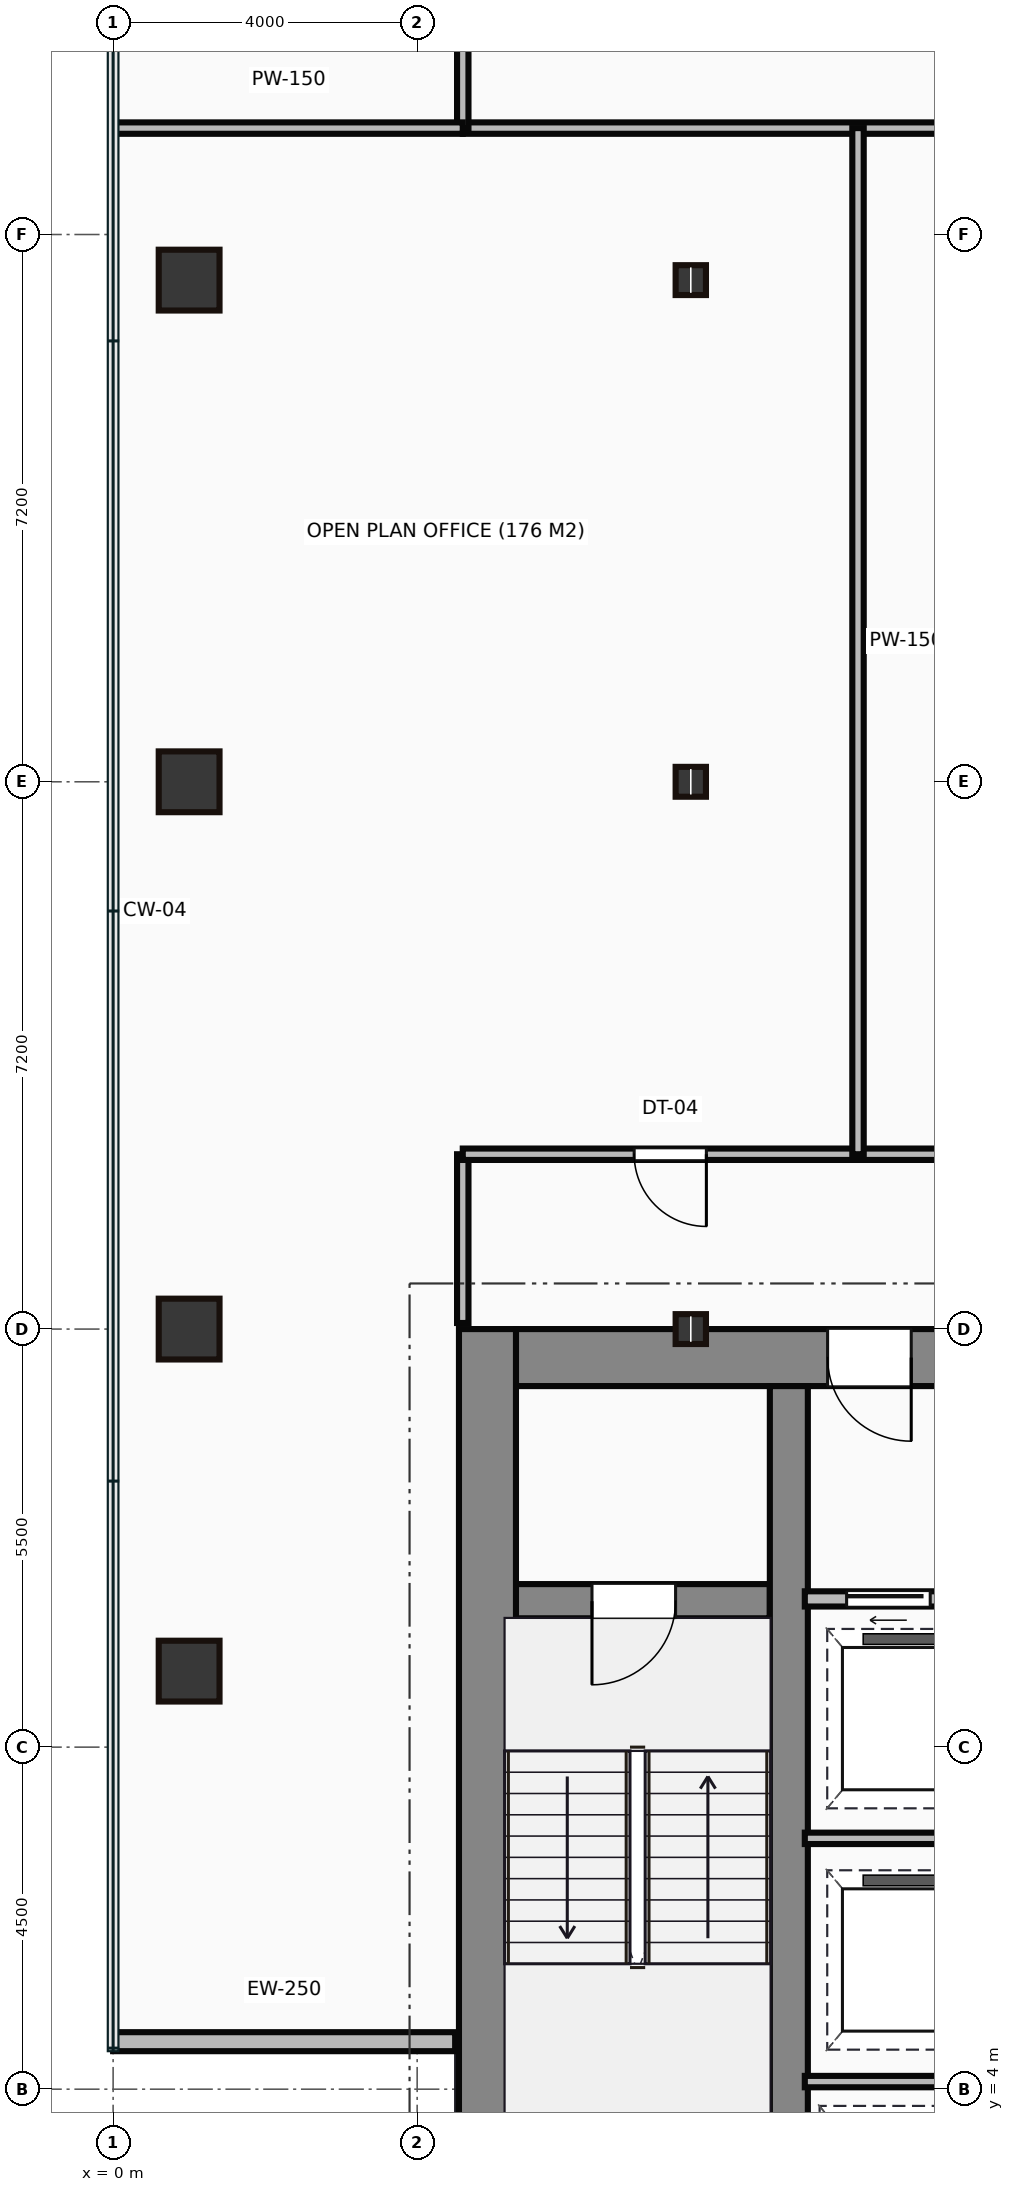
"""IFC4 building model, lengths in metres.
Left out: names, types, materials, properties, quantities, classifications, styles, units other than length and angle.
Written with IfcOpenShell. Run it as: python <this file> out.ifc"""

import sys

from ifc_helpers import new_model, si_unit, direction, frame, frame_2d, origin, origin_2d, place, context, subcontext, project, spatial, rectangle, hollow_rectangle, i_section, extrude, source, transform, mapped, element, fill, save


model = new_model("IFC4")
c1 = context("Model", 3, precision=1e-05, world=origin(), true_north=direction((0.0, 1.0)))
c2 = subcontext(c1, "Body", "Model", "MODEL_VIEW")
j1 = project(units=[si_unit("LENGTHUNIT", "METRE"), si_unit("PLANEANGLEUNIT", "RADIAN")], contexts=[c1])
p1 = place(None, origin())
s1 = spatial("IfcSite", under=j1, at=p1, CompositionType="ELEMENT")
p2 = place(p1, origin())
s2 = spatial("IfcBuilding", under=s1, at=p2, CompositionType="ELEMENT")
p3 = place(p2, frame((0.0, 0.0, 121.5)))
s3 = spatial("IfcBuildingStorey", under=s2, at=p3, CompositionType="ELEMENT", Elevation=121.5)
m1 = source(origin(), c2, "Body", "SweptSolid", [
    extrude(rectangle(XDim=13.1, YDim=0.75, at=frame_2d((6.55, 0.0))), origin(), (0.0, 0.0, 1.0), 3.65),
])
p4 = place(p3, frame((4.925, 0.9, 0.0), z_axis=(0.0, 0.0, 1.0), x_axis=(0.0, 1.0, 0.0)))
e1 = element("IfcWall", 1, at=p4, inside=s3, PredefinedType="SHEAR", context=c2, shape_type="MappedRepresentation", body=[
    mapped(m1, transform((0.0, 0.0, 0.0))),
])
m2 = source(origin(), c2, "Body", "SweptSolid", [
    extrude(rectangle(XDim=9.1, YDim=0.75, at=frame_2d((4.55, 0.0))), origin(), (0.0, 0.0, 1.0), 3.65),
])
p5 = place(p3, frame((5.3, 13.625, 0.0), z_axis=(0.0, 0.0, 1.0), x_axis=(1.0, 0.0, 0.0)))
e2 = element("IfcWall", 2, at=p5, inside=s3, PredefinedType="SHEAR", context=c2, shape_type="MappedRepresentation", body=[
    mapped(m2, transform((0.0, 0.0, 0.0))),
])
p6 = place(p5, frame((4.1, 0.0, 0.0)))
e3 = element("IfcOpeningElement", 3, at=p6, cuts=e2, PredefinedType="OPENING", context=c2, shape_type="SweptSolid", body=[
    extrude(rectangle(XDim=1.1, YDim=2.15, at=frame_2d((0.55, 1.075))), frame((0.0, 0.385, 0.0), z_axis=(0.0, -1.0, 0.0), x_axis=(1.0, 0.0, 0.0)), (0.0, 0.0, 1.0), 0.77),
])
m3 = source(origin(), c2, "Body", "SweptSolid", [
    extrude(rectangle(XDim=12.35, YDim=0.5, at=frame_2d((6.175, 0.0))), origin(), (0.0, 0.0, 1.0), 3.65),
])
p7 = place(p3, frame((8.89, 0.9, 0.0), z_axis=(0.0, 0.0, 1.0), x_axis=(0.0, 1.0, 0.0)))
e4 = element("IfcWall", 4, at=p7, inside=s3, PredefinedType="SHEAR", context=c2, shape_type="MappedRepresentation", body=[
    mapped(m3, transform((0.0, 0.0, 0.0))),
])
m4 = source(origin(), c2, "Body", "SweptSolid", [
    extrude(rectangle(XDim=3.39, YDim=0.45, at=frame_2d((1.695, 0.0))), origin(), (0.0, 0.0, 1.0), 3.65),
])
p8 = place(p3, frame((5.25, 10.42, 0.0), z_axis=(0.0, 0.0, 1.0), x_axis=(1.0, 0.0, 0.0)))
e5 = element("IfcWall", 5, at=p8, inside=s3, PredefinedType="SHEAR", context=c2, shape_type="MappedRepresentation", body=[
    mapped(m4, transform((0.0, 0.0, 0.0))),
])
p9 = place(p8, frame((1.05, 0.0, 0.0)))
e6 = element("IfcOpeningElement", 6, at=p9, cuts=e5, PredefinedType="OPENING", context=c2, shape_type="SweptSolid", body=[
    extrude(rectangle(XDim=1.1, YDim=2.15, at=frame_2d((0.55, 1.075))), frame((0.0, 0.235, 0.0), z_axis=(0.0, -1.0, 0.0), x_axis=(1.0, 0.0, 0.0)), (0.0, 0.0, 1.0), 0.47),
])
m5 = source(origin(), c2, "Body", "SweptSolid", [
    extrude(hollow_rectangle(XDim=0.8, YDim=0.8, WallThickness=0.04, at=origin_2d()), origin(), (0.0, 0.0, 1.0), 3.65),
])
for number, where, z_axis, x_axis in (
    (7, (1.0, 9.5, 0.0), (0.0, 0.0, 1.0), (1.0, 0.0, 0.0)),
    (8, (1.0, 14.0, 0.0), (0.0, 0.0, 1.0), (1.0, 0.0, 0.0)),
    (9, (1.0, 21.2, 0.0), (0.0, 0.0, 1.0), (1.0, 0.0, 0.0)),
    (10, (1.0, 27.8, 0.0), (0.0, 0.0, 1.0), (1.0, 0.0, 0.0)),
):
    element("IfcColumn", number, at=place(p3, frame(where, z_axis=z_axis, x_axis=x_axis)), inside=s3, PredefinedType="COLUMN", context=c2, shape_type="MappedRepresentation", body=[
        mapped(m5, transform((0.0, 0.0, 0.0))),
    ])
m6 = source(origin(), c2, "Body", "SweptSolid", [
    extrude(i_section(OverallWidth=0.399, OverallDepth=0.393, WebThickness=0.023, FlangeThickness=0.037, at=origin_2d()), origin(), (0.0, 0.0, 1.0), 3.65),
])
for number, where, z_axis, x_axis in (
    (11, (7.6, 14.0, 0.0), (0.0, 0.0, 1.0), (1.0, 0.0, 0.0)),
    (12, (7.6, 21.2, 0.0), (0.0, 0.0, 1.0), (1.0, 0.0, 0.0)),
    (13, (7.6, 27.8, 0.0), (0.0, 0.0, 1.0), (1.0, 0.0, 0.0)),
):
    element("IfcColumn", number, at=place(p3, frame(where, z_axis=z_axis, x_axis=x_axis)), inside=s3, PredefinedType="COLUMN", context=c2, shape_type="MappedRepresentation", body=[
        mapped(m6, transform((0.0, 0.0, 0.0))),
    ])
m7 = source(origin(), c2, "Body", "SweptSolid", [
    extrude(rectangle(XDim=4.5, YDim=0.25, at=frame_2d((2.25, 0.0))), origin(), (0.0, 0.0, 1.0), 3.4),
])
p10 = place(p3, frame((0.0, 4.625, 0.0), z_axis=(0.0, 0.0, 1.0), x_axis=(1.0, 0.0, 0.0)))
e14 = element("IfcWall", 14, at=p10, inside=s3, PredefinedType="STANDARD", context=c2, shape_type="MappedRepresentation", body=[
    mapped(m7, transform((0.0, 0.0, 0.0))),
])
m8 = source(origin(), c2, "Body", "SweptSolid", [
    extrude(rectangle(XDim=2.35, YDim=0.2, at=frame_2d((1.175, 0.0))), origin(), (0.0, 0.0, 1.0), 3.4),
])
p11 = place(p3, frame((9.1, 10.45, 0.0), z_axis=(0.0, 0.0, 1.0), x_axis=(1.0, 0.0, 0.0)))
e15 = element("IfcWall", 15, at=p11, inside=s3, PredefinedType="PARTITIONING", context=c2, shape_type="MappedRepresentation", body=[
    mapped(m8, transform((0.0, 0.0, 0.0))),
])
p12 = place(p11, frame((0.55, 0.0, 0.0)))
e16 = element("IfcOpeningElement", 16, at=p12, cuts=e15, PredefinedType="OPENING", context=c2, shape_type="SweptSolid", body=[
    extrude(rectangle(XDim=1.1, YDim=2.15, at=frame_2d((0.55, 1.075))), frame((0.0, 0.11, 0.0), z_axis=(0.0, -1.0, 0.0), x_axis=(1.0, 0.0, 0.0)), (0.0, 0.0, 1.0), 0.22),
])
m9 = source(origin(), c2, "Body", "SweptSolid", [
    extrude(rectangle(XDim=2.4, YDim=0.15, at=frame_2d((1.2, 0.0))), origin(), (0.0, 0.0, 1.0), 3.4),
])
for number, where, z_axis, x_axis in (
    (17, (9.1, 4.1, 0.0), (0.0, 0.0, 1.0), (1.0, 0.0, 0.0)),
    (18, (9.1, 7.3, 0.0), (0.0, 0.0, 1.0), (1.0, 0.0, 0.0)),
):
    element("IfcWall", number, at=place(p3, frame(where, z_axis=z_axis, x_axis=x_axis)), inside=s3, PredefinedType="PARTITIONING", context=c2, shape_type="MappedRepresentation", body=[
        mapped(m9, transform((0.0, 0.0, 0.0))),
    ])
m10 = source(origin(), c2, "Body", "SweptSolid", [
    extrude(rectangle(XDim=2.22, YDim=0.15, at=frame_2d((1.11, 0.0))), origin(), (0.0, 0.0, 1.0), 3.4),
])
p13 = place(p3, frame((4.6, 14.08, 0.0), z_axis=(0.0, 0.0, 1.0), x_axis=(0.0, 1.0, 0.0)))
e19 = element("IfcWall", 19, at=p13, inside=s3, PredefinedType="PARTITIONING", context=c2, shape_type="MappedRepresentation", body=[
    mapped(m10, transform((0.0, 0.0, 0.0))),
])
m11 = source(origin(), c2, "Body", "SweptSolid", [
    extrude(rectangle(XDim=32.6, YDim=0.15, at=frame_2d((16.3, 0.0))), origin(), (0.0, 0.0, 1.0), 3.4),
])
p14 = place(p3, frame((4.6, 16.3, 0.0), z_axis=(0.0, 0.0, 1.0), x_axis=(1.0, 0.0, 0.0)))
e20 = element("IfcWall", 20, at=p14, inside=s3, PredefinedType="PARTITIONING", context=c2, shape_type="MappedRepresentation", body=[
    mapped(m11, transform((0.0, 0.0, 0.0))),
])
p15 = place(p14, frame((2.255, 0.0, 0.0)))
e21 = element("IfcOpeningElement", 21, at=p15, cuts=e20, PredefinedType="OPENING", context=c2, shape_type="SweptSolid", body=[
    extrude(rectangle(XDim=0.95, YDim=2.15, at=frame_2d((0.475, 1.075))), frame((0.0, 0.085, 0.0), z_axis=(0.0, -1.0, 0.0), x_axis=(1.0, 0.0, 0.0)), (0.0, 0.0, 1.0), 0.17),
])
p16 = place(p3, frame((37.2, 29.8, 0.0), z_axis=(0.0, 0.0, 1.0), x_axis=(-1.0, 0.0, 0.0)))
e22 = element("IfcWall", 22, at=p16, inside=s3, PredefinedType="PARTITIONING", context=c2, shape_type="MappedRepresentation", body=[
    mapped(m11, transform((0.0, 0.0, 0.0))),
])
p17 = place(p16, frame((22.025, 0.0, 0.0)))
e23 = element("IfcOpeningElement", 23, at=p17, cuts=e22, PredefinedType="OPENING", context=c2, shape_type="SweptSolid", body=[
    extrude(rectangle(XDim=0.95, YDim=2.15, at=frame_2d((0.475, 1.075))), frame((0.0, 0.085, 0.0), z_axis=(0.0, -1.0, 0.0), x_axis=(1.0, 0.0, 0.0)), (0.0, 0.0, 1.0), 0.17),
])
p18 = place(p16, frame((12.025, 0.0, 0.0)))
e24 = element("IfcOpeningElement", 24, at=p18, cuts=e22, PredefinedType="OPENING", context=c2, shape_type="SweptSolid", body=[
    extrude(rectangle(XDim=0.95, YDim=2.15, at=frame_2d((0.475, 1.075))), frame((0.0, 0.085, 0.0), z_axis=(0.0, -1.0, 0.0), x_axis=(1.0, 0.0, 0.0)), (0.0, 0.0, 1.0), 0.17),
])
m12 = source(origin(), c2, "Body", "SweptSolid", [
    extrude(rectangle(XDim=2.1, YDim=0.15, at=frame_2d((1.05, 0.0))), origin(), (0.0, 0.0, 1.0), 3.4),
])
p19 = place(p3, frame((4.6, 29.8, 0.0), z_axis=(0.0, 0.0, 1.0), x_axis=(0.0, 1.0, 0.0)))
e25 = element("IfcWall", 25, at=p19, inside=s3, PredefinedType="PARTITIONING", context=c2, shape_type="MappedRepresentation", body=[
    mapped(m12, transform((0.0, 0.0, 0.0))),
])
m13 = source(origin(), c2, "Body", "SweptSolid", [
    extrude(rectangle(XDim=4.58, YDim=0.15, at=frame_2d((2.29, 0.0))), origin(), (0.0, 0.0, 1.0), 3.4),
])
p20 = place(p3, frame((0.02, 29.8, 0.0), z_axis=(0.0, 0.0, 1.0), x_axis=(1.0, 0.0, 0.0)))
e26 = element("IfcWall", 26, at=p20, inside=s3, PredefinedType="PARTITIONING", context=c2, shape_type="MappedRepresentation", body=[
    mapped(m13, transform((0.0, 0.0, 0.0))),
])
m14 = source(origin(), c2, "Body", "SweptSolid", [
    extrude(rectangle(XDim=13.5, YDim=0.15, at=frame_2d((6.75, 0.0))), origin(), (0.0, 0.0, 1.0), 3.4),
])
p21 = place(p3, frame((9.8, 29.8, 0.0), z_axis=(0.0, 0.0, 1.0), x_axis=(0.0, -1.0, 0.0)))
e27 = element("IfcWall", 27, at=p21, inside=s3, PredefinedType="PARTITIONING", context=c2, shape_type="MappedRepresentation", body=[
    mapped(m14, transform((0.0, 0.0, 0.0))),
])
m15 = source(origin(), c2, "Body", "SweptSolid", [
    extrude(rectangle(XDim=1.1, YDim=2.15, at=frame_2d((0.55, 1.075))), frame((0.0, 0.025, 0.0), z_axis=(0.0, -1.0, 0.0), x_axis=(1.0, 0.0, 0.0)), (0.0, 0.0, 1.0), 0.05),
])
p22 = place(p9, frame((1.1, 0.0, 0.0), z_axis=(0.0, 0.0, 1.0), x_axis=(-1.0, 0.0, 0.0)))
e28 = element("IfcDoor", 28, at=p22, inside=s3, OperationType="SINGLE_SWING_LEFT", PredefinedType="DOOR", context=c2, shape_type="MappedRepresentation", body=[
    mapped(m15, transform((0.0, 0.0, 0.0))),
])
fill(e6, e28)
p23 = place(p6, origin())
e29 = element("IfcDoor", 29, at=p23, inside=s3, OperationType="SINGLE_SWING_RIGHT", PredefinedType="DOOR", context=c2, shape_type="MappedRepresentation", body=[
    mapped(m15, transform((0.0, 0.0, 0.0))),
])
fill(e3, e29)
p24 = place(p12, origin())
e30 = element("IfcDoor", 30, at=p24, inside=s3, OperationType="SLIDING_TO_LEFT", PredefinedType="DOOR", context=c2, shape_type="MappedRepresentation", body=[
    mapped(m15, transform((0.0, 0.0, 0.0))),
])
fill(e16, e30)
m16 = source(origin(), c2, "Body", "SweptSolid", [
    extrude(rectangle(XDim=0.95, YDim=2.15, at=frame_2d((0.475, 1.075))), frame((0.0, 0.025, 0.0), z_axis=(0.0, -1.0, 0.0), x_axis=(1.0, 0.0, 0.0)), (0.0, 0.0, 1.0), 0.05),
])
p25 = place(p15, origin())
e31 = element("IfcDoor", 31, at=p25, inside=s3, OperationType="SINGLE_SWING_RIGHT", PredefinedType="DOOR", context=c2, shape_type="MappedRepresentation", body=[
    mapped(m16, transform((0.0, 0.0, 0.0))),
])
fill(e21, e31)
save(model, sys.argv[1])
